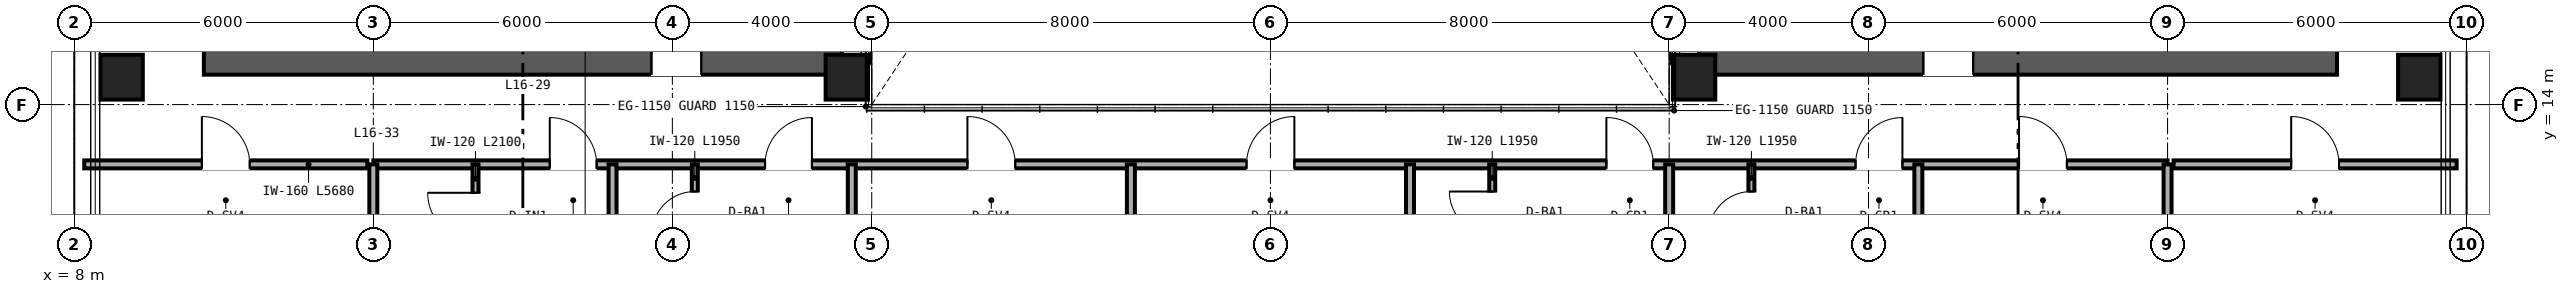
"""IFC4 building model, lengths in metres.
Left out: names, types, materials, properties, quantities, classifications, styles, units other than length and angle.
Written with IfcOpenShell. Run it as: python <this file> out.ifc"""

import sys

from ifc_helpers import new_model, si_unit, direction, frame, frame_2d, origin, origin_2d, place, context, subcontext, project, spatial, rectangle, hollow_rectangle, extrude, source, transform, mapped, element, fill, save


model = new_model("IFC4")
c1 = context("Model", 3, precision=1e-05, world=origin(), true_north=direction((0.0, 1.0)))
c2 = subcontext(c1, "Body", "Model", "MODEL_VIEW")
j1 = project(units=[si_unit("LENGTHUNIT", "METRE"), si_unit("PLANEANGLEUNIT", "RADIAN")], contexts=[c1])
p1 = place(None, origin())
s1 = spatial("IfcSite", under=j1, at=p1, CompositionType="ELEMENT")
p2 = place(p1, origin())
s2 = spatial("IfcBuilding", under=s1, at=p2, CompositionType="ELEMENT")
p3 = place(p2, frame((0.0, 0.0, 67.2)))
s3 = spatial("IfcBuildingStorey", under=s2, at=p3, CompositionType="ELEMENT", Elevation=67.2)
p4 = place(p3, frame((10.6, 15.0, 0.0), z_axis=(0.0, 0.0, 1.0), x_axis=(1.0, 0.0, 0.0)))
e1 = element("IfcWall", 1, at=p4, inside=s3, PredefinedType="SHEAR", context=c2, shape_type="SweptSolid", body=[
    extrude(rectangle(XDim=12.8, YDim=0.8, at=frame_2d((6.4, 0.0))), origin(), (0.0, 0.0, 1.0), 3.35),
])
p5 = place(p4, frame((8.98, 0.0, 0.0)))
e2 = element("IfcOpeningElement", 2, at=p5, cuts=e1, PredefinedType="OPENING", context=c2, shape_type="SweptSolid", body=[
    extrude(rectangle(XDim=1.0, YDim=2.15, at=frame_2d((0.5, 1.075))), frame((0.0, 0.41, 0.0), z_axis=(0.0, -1.0, 0.0), x_axis=(1.0, 0.0, 0.0)), (0.0, 0.0, 1.0), 0.82),
])
p6 = place(p3, frame((40.6, 15.0, 0.0), z_axis=(0.0, 0.0, 1.0), x_axis=(1.0, 0.0, 0.0)))
e3 = element("IfcWall", 3, at=p6, inside=s3, PredefinedType="SHEAR", context=c2, shape_type="SweptSolid", body=[
    extrude(rectangle(XDim=12.8, YDim=0.8, at=frame_2d((6.4, 0.0))), origin(), (0.0, 0.0, 1.0), 3.35),
])
p7 = place(p6, frame((4.5, 0.0, 0.0)))
e4 = element("IfcOpeningElement", 4, at=p7, cuts=e3, PredefinedType="OPENING", context=c2, shape_type="SweptSolid", body=[
    extrude(rectangle(XDim=1.0, YDim=2.15, at=frame_2d((0.5, 1.075))), frame((0.0, 0.41, 0.0), z_axis=(0.0, -1.0, 0.0), x_axis=(1.0, 0.0, 0.0)), (0.0, 0.0, 1.0), 0.82),
])
m1 = source(origin(), c2, "Body", "SweptSolid", [
    extrude(hollow_rectangle(XDim=0.85, YDim=0.9, WallThickness=0.04, at=origin_2d()), origin(), (0.0, 0.0, 1.0), 3.35),
])
for number, where, z_axis, x_axis in (
    (5, (8.95, 14.55, 0.0), (0.0, 0.0, 1.0), (1.0, 0.0, 0.0)),
    (6, (23.5, 14.55, 0.0), (0.0, 0.0, 1.0), (1.0, 0.0, 0.0)),
    (7, (40.5, 14.55, 0.0), (0.0, 0.0, 1.0), (1.0, 0.0, 0.0)),
    (8, (55.05, 14.55, 0.0), (0.0, 0.0, 1.0), (1.0, 0.0, 0.0)),
):
    element("IfcColumn", number, at=place(p3, frame(where, z_axis=z_axis, x_axis=x_axis)), inside=s3, PredefinedType="COLUMN", context=c2, shape_type="MappedRepresentation", body=[
        mapped(m1, transform((0.0, 0.0, 0.0), scale=1.0)),
    ])
p8 = place(p3, frame((8.2, 12.8, 0.0), z_axis=(0.0, 0.0, 1.0), x_axis=(1.0, 0.0, 0.0)))
e9 = element("IfcWall", 9, at=p8, inside=s3, PredefinedType="PARTITIONING", context=c2, shape_type="SweptSolid", body=[
    extrude(rectangle(XDim=5.68, YDim=0.16, at=frame_2d((2.84, 0.0))), origin(), (0.0, 0.0, 1.0), 3.35),
])
p9 = place(p8, frame((2.36, 0.0, 0.0)))
e10 = element("IfcOpeningElement", 10, at=p9, cuts=e9, PredefinedType="OPENING", context=c2, shape_type="SweptSolid", body=[
    extrude(rectangle(XDim=0.96, YDim=2.15, at=frame_2d((0.48, 1.075))), frame((0.0, 0.09, 0.0), z_axis=(0.0, -1.0, 0.0), x_axis=(1.0, 0.0, 0.0)), (0.0, 0.0, 1.0), 0.18),
])
p10 = place(p3, frame((50.12, 12.8, 0.0), z_axis=(0.0, 0.0, 1.0), x_axis=(1.0, 0.0, 0.0)))
e11 = element("IfcWall", 11, at=p10, inside=s3, PredefinedType="PARTITIONING", context=c2, shape_type="SweptSolid", body=[
    extrude(rectangle(XDim=5.68, YDim=0.16, at=frame_2d((2.84, 0.0))), origin(), (0.0, 0.0, 1.0), 3.35),
])
p11 = place(p10, frame((2.36, 0.0, 0.0)))
e12 = element("IfcOpeningElement", 12, at=p11, cuts=e11, PredefinedType="OPENING", context=c2, shape_type="SweptSolid", body=[
    extrude(rectangle(XDim=0.96, YDim=2.15, at=frame_2d((0.48, 1.075))), frame((0.0, 0.09, 0.0), z_axis=(0.0, -1.0, 0.0), x_axis=(1.0, 0.0, 0.0)), (0.0, 0.0, 1.0), 0.18),
])
p12 = place(p3, frame((14.0, 12.8, 0.0), z_axis=(0.0, 0.0, 1.0), x_axis=(1.0, 0.0, 0.0)))
e13 = element("IfcWall", 13, at=p12, inside=s3, PredefinedType="PARTITIONING", context=c2, shape_type="SweptSolid", body=[
    extrude(rectangle(XDim=36.0, YDim=0.16, at=frame_2d((18.0, 0.0))), origin(), (0.0, 0.0, 1.0), 2.571),
])
p13 = place(p12, frame((3.54, 0.0, 0.0)))
e14 = element("IfcOpeningElement", 14, at=p13, cuts=e13, PredefinedType="OPENING", context=c2, shape_type="SweptSolid", body=[
    extrude(rectangle(XDim=0.94, YDim=2.15, at=frame_2d((0.47, 1.075))), frame((0.0, 0.09, 0.0), z_axis=(0.0, -1.0, 0.0), x_axis=(1.0, 0.0, 0.0)), (0.0, 0.0, 1.0), 0.18),
])
p14 = place(p12, frame((7.86, 0.0, 0.0)))
e15 = element("IfcOpeningElement", 15, at=p14, cuts=e13, PredefinedType="OPENING", context=c2, shape_type="SweptSolid", body=[
    extrude(rectangle(XDim=0.94, YDim=2.15, at=frame_2d((0.47, 1.075))), frame((0.0, 0.09, 0.0), z_axis=(0.0, -1.0, 0.0), x_axis=(1.0, 0.0, 0.0)), (0.0, 0.0, 1.0), 0.18),
])
p15 = place(p12, frame((11.92, 0.0, 0.0)))
e16 = element("IfcOpeningElement", 16, at=p15, cuts=e13, PredefinedType="OPENING", context=c2, shape_type="SweptSolid", body=[
    extrude(rectangle(XDim=0.96, YDim=2.15, at=frame_2d((0.48, 1.075))), frame((0.0, 0.09, 0.0), z_axis=(0.0, -1.0, 0.0), x_axis=(1.0, 0.0, 0.0)), (0.0, 0.0, 1.0), 0.18),
])
p16 = place(p12, frame((17.52, 0.0, 0.0)))
e17 = element("IfcOpeningElement", 17, at=p16, cuts=e13, PredefinedType="OPENING", context=c2, shape_type="SweptSolid", body=[
    extrude(rectangle(XDim=0.96, YDim=2.15, at=frame_2d((0.48, 1.075))), frame((0.0, 0.09, 0.0), z_axis=(0.0, -1.0, 0.0), x_axis=(1.0, 0.0, 0.0)), (0.0, 0.0, 1.0), 0.18),
])
p17 = place(p12, frame((24.74, 0.0, 0.0)))
e18 = element("IfcOpeningElement", 18, at=p17, cuts=e13, PredefinedType="OPENING", context=c2, shape_type="SweptSolid", body=[
    extrude(rectangle(XDim=0.94, YDim=2.15, at=frame_2d((0.47, 1.075))), frame((0.0, 0.09, 0.0), z_axis=(0.0, -1.0, 0.0), x_axis=(1.0, 0.0, 0.0)), (0.0, 0.0, 1.0), 0.18),
])
p18 = place(p12, frame((29.74, 0.0, 0.0)))
e19 = element("IfcOpeningElement", 19, at=p18, cuts=e13, PredefinedType="OPENING", context=c2, shape_type="SweptSolid", body=[
    extrude(rectangle(XDim=0.94, YDim=2.15, at=frame_2d((0.47, 1.075))), frame((0.0, 0.09, 0.0), z_axis=(0.0, -1.0, 0.0), x_axis=(1.0, 0.0, 0.0)), (0.0, 0.0, 1.0), 0.18),
])
p19 = place(p12, frame((33.02, 0.0, 0.0)))
e20 = element("IfcOpeningElement", 20, at=p19, cuts=e13, PredefinedType="OPENING", context=c2, shape_type="SweptSolid", body=[
    extrude(rectangle(XDim=0.96, YDim=2.15, at=frame_2d((0.48, 1.075))), frame((0.0, 0.09, 0.0), z_axis=(0.0, -1.0, 0.0), x_axis=(1.0, 0.0, 0.0)), (0.0, 0.0, 1.0), 0.18),
])
for number, where, z_axis, x_axis in (
    (21, (14.0, 2.36, 0.0), (0.0, 0.0, 1.0), (0.0, 1.0, 0.0)),
    (22, (50.0, 2.36, 0.0), (0.0, 0.0, 1.0), (0.0, 1.0, 0.0)),
    (23, (18.8, 2.36, 0.0), (0.0, 0.0, 1.0), (0.0, 1.0, 0.0)),
):
    element("IfcWall", number, at=place(p3, frame(where, z_axis=z_axis, x_axis=x_axis)), inside=s3, PredefinedType="PARTITIONING", context=c2, shape_type="SweptSolid", body=[
        extrude(rectangle(XDim=10.44, YDim=0.16, at=frame_2d((5.22, 0.0))), origin(), (0.0, 0.0, 1.0), 2.657),
    ])
p20 = place(p3, frame((16.05, 10.7, 0.0), z_axis=(0.0, 0.0, 1.0), x_axis=(0.0, 1.0, 0.0)))
e24 = element("IfcWall", 24, at=p20, inside=s3, PredefinedType="PARTITIONING", context=c2, shape_type="SweptSolid", body=[
    extrude(rectangle(XDim=2.1, YDim=0.12, at=frame_2d((1.05, 0.0))), origin(), (0.0, 0.0, 1.0), 3.35),
])
p21 = place(p20, frame((0.57, 0.0, 0.0)))
e25 = element("IfcOpeningElement", 25, at=p21, cuts=e24, PredefinedType="OPENING", context=c2, shape_type="SweptSolid", body=[
    extrude(rectangle(XDim=0.96, YDim=2.15, at=frame_2d((0.48, 1.075))), frame((0.0, 0.07, 0.0), z_axis=(0.0, -1.0, 0.0), x_axis=(1.0, 0.0, 0.0)), (0.0, 0.0, 1.0), 0.14),
])
p22 = place(p3, frame((23.6, 2.36, 0.0), z_axis=(0.0, 0.0, 1.0), x_axis=(0.0, 1.0, 0.0)))
e26 = element("IfcWall", 26, at=p22, inside=s3, PredefinedType="PARTITIONING", context=c2, shape_type="SweptSolid", body=[
    extrude(rectangle(XDim=10.44, YDim=0.16, at=frame_2d((5.22, 0.0))), origin(), (0.0, 0.0, 1.0), 2.423),
])
p23 = place(p3, frame((20.45, 10.85, 0.0), z_axis=(0.0, 0.0, 1.0), x_axis=(0.0, 1.0, 0.0)))
e27 = element("IfcWall", 27, at=p23, inside=s3, PredefinedType="PARTITIONING", context=c2, shape_type="SweptSolid", body=[
    extrude(rectangle(XDim=1.95, YDim=0.12, at=frame_2d((0.975, 0.0))), origin(), (0.0, 0.0, 1.0), 3.35),
])
p24 = place(p23, frame((0.545, 0.0, 0.0)))
e28 = element("IfcOpeningElement", 28, at=p24, cuts=e27, PredefinedType="OPENING", context=c2, shape_type="SweptSolid", body=[
    extrude(rectangle(XDim=0.86, YDim=2.1, at=frame_2d((0.43, 1.05))), frame((0.0, 0.07, 0.0), z_axis=(0.0, -1.0, 0.0), x_axis=(1.0, 0.0, 0.0)), (0.0, 0.0, 1.0), 0.14),
])
for number, where, z_axis, x_axis in (
    (29, (29.2, 2.36, 0.0), (0.0, 0.0, 1.0), (0.0, 1.0, 0.0)),
    (30, (34.8, 2.36, 0.0), (0.0, 0.0, 1.0), (0.0, 1.0, 0.0)),
    (31, (40.0, 2.36, 0.0), (0.0, 0.0, 1.0), (0.0, 1.0, 0.0)),
):
    element("IfcWall", number, at=place(p3, frame(where, z_axis=z_axis, x_axis=x_axis)), inside=s3, PredefinedType="PARTITIONING", context=c2, shape_type="SweptSolid", body=[
        extrude(rectangle(XDim=10.44, YDim=0.16, at=frame_2d((5.22, 0.0))), origin(), (0.0, 0.0, 1.0), 2.423),
    ])
p25 = place(p3, frame((36.45, 10.85, 0.0), z_axis=(0.0, 0.0, 1.0), x_axis=(0.0, 1.0, 0.0)))
e32 = element("IfcWall", 32, at=p25, inside=s3, PredefinedType="PARTITIONING", context=c2, shape_type="SweptSolid", body=[
    extrude(rectangle(XDim=1.95, YDim=0.12, at=frame_2d((0.975, 0.0))), origin(), (0.0, 0.0, 1.0), 3.35),
])
p26 = place(p25, frame((0.545, 0.0, 0.0)))
e33 = element("IfcOpeningElement", 33, at=p26, cuts=e32, PredefinedType="OPENING", context=c2, shape_type="SweptSolid", body=[
    extrude(rectangle(XDim=0.86, YDim=2.1, at=frame_2d((0.43, 1.05))), frame((0.0, 0.07, 0.0), z_axis=(0.0, -1.0, 0.0), x_axis=(1.0, 0.0, 0.0)), (0.0, 0.0, 1.0), 0.14),
])
p27 = place(p3, frame((45.0, 2.36, 0.0), z_axis=(0.0, 0.0, 1.0), x_axis=(0.0, 1.0, 0.0)))
e34 = element("IfcWall", 34, at=p27, inside=s3, PredefinedType="PARTITIONING", context=c2, shape_type="SweptSolid", body=[
    extrude(rectangle(XDim=10.44, YDim=0.16, at=frame_2d((5.22, 0.0))), origin(), (0.0, 0.0, 1.0), 2.657),
])
p28 = place(p3, frame((41.65, 10.85, 0.0), z_axis=(0.0, 0.0, 1.0), x_axis=(0.0, 1.0, 0.0)))
e35 = element("IfcWall", 35, at=p28, inside=s3, PredefinedType="PARTITIONING", context=c2, shape_type="SweptSolid", body=[
    extrude(rectangle(XDim=1.95, YDim=0.12, at=frame_2d((0.975, 0.0))), origin(), (0.0, 0.0, 1.0), 3.35),
])
p29 = place(p28, frame((0.545, 0.0, 0.0)))
e36 = element("IfcOpeningElement", 36, at=p29, cuts=e35, PredefinedType="OPENING", context=c2, shape_type="SweptSolid", body=[
    extrude(rectangle(XDim=0.86, YDim=2.1, at=frame_2d((0.43, 1.05))), frame((0.0, 0.07, 0.0), z_axis=(0.0, -1.0, 0.0), x_axis=(1.0, 0.0, 0.0)), (0.0, 0.0, 1.0), 0.14),
])
m2 = source(origin(), c2, "Body", "SweptSolid", [
    extrude(rectangle(XDim=1.0, YDim=2.15, at=frame_2d((0.5, 1.075))), frame((0.0, 0.025, 0.0), z_axis=(0.0, -1.0, 0.0), x_axis=(1.0, 0.0, 0.0)), (0.0, 0.0, 1.0), 0.05),
])
p30 = place(p5, origin())
e37 = element("IfcDoor", 37, at=p30, inside=s3, OperationType="SINGLE_SWING_LEFT", PredefinedType="DOOR", context=c2, shape_type="MappedRepresentation", body=[
    mapped(m2, transform((0.0, 0.0, 0.0), scale=1.0)),
])
fill(e2, e37)
p31 = place(p7, origin())
e38 = element("IfcDoor", 38, at=p31, inside=s3, OperationType="SINGLE_SWING_RIGHT", PredefinedType="DOOR", context=c2, shape_type="MappedRepresentation", body=[
    mapped(m2, transform((0.0, 0.0, 0.0), scale=1.0)),
])
fill(e4, e38)
m3 = source(origin(), c2, "Body", "SweptSolid", [
    extrude(rectangle(XDim=0.96, YDim=2.15, at=frame_2d((0.48, 1.075))), frame((0.0, 0.025, 0.0), z_axis=(0.0, -1.0, 0.0), x_axis=(1.0, 0.0, 0.0)), (0.0, 0.0, 1.0), 0.05),
])
p32 = place(p9, origin())
e39 = element("IfcDoor", 39, at=p32, inside=s3, OperationType="SINGLE_SWING_LEFT", PredefinedType="DOOR", context=c2, shape_type="MappedRepresentation", body=[
    mapped(m3, transform((0.0, 0.0, 0.0), scale=1.0)),
])
fill(e10, e39)
p33 = place(p11, origin())
e40 = element("IfcDoor", 40, at=p33, inside=s3, OperationType="SINGLE_SWING_LEFT", PredefinedType="DOOR", context=c2, shape_type="MappedRepresentation", body=[
    mapped(m3, transform((0.0, 0.0, 0.0), scale=1.0)),
])
fill(e12, e40)
p34 = place(p21, origin())
e41 = element("IfcDoor", 41, at=p34, inside=s3, OperationType="SINGLE_SWING_RIGHT", PredefinedType="DOOR", context=c2, shape_type="MappedRepresentation", body=[
    mapped(m3, transform((0.0, 0.0, 0.0), scale=1.0)),
])
fill(e25, e41)
m4 = source(origin(), c2, "Body", "SweptSolid", [
    extrude(rectangle(XDim=0.86, YDim=2.1, at=frame_2d((0.43, 1.05))), frame((0.0, 0.025, 0.0), z_axis=(0.0, -1.0, 0.0), x_axis=(1.0, 0.0, 0.0)), (0.0, 0.0, 1.0), 0.05),
])
p35 = place(p24, origin())
e42 = element("IfcDoor", 42, at=p35, inside=s3, OperationType="SINGLE_SWING_LEFT", PredefinedType="DOOR", context=c2, shape_type="MappedRepresentation", body=[
    mapped(m4, transform((0.0, 0.0, 0.0), scale=1.0)),
])
fill(e28, e42)
p36 = place(p26, origin())
e43 = element("IfcDoor", 43, at=p36, inside=s3, OperationType="SINGLE_SWING_RIGHT", PredefinedType="DOOR", context=c2, shape_type="MappedRepresentation", body=[
    mapped(m4, transform((0.0, 0.0, 0.0), scale=1.0)),
])
fill(e33, e43)
p37 = place(p29, origin())
e44 = element("IfcDoor", 44, at=p37, inside=s3, OperationType="SINGLE_SWING_LEFT", PredefinedType="DOOR", context=c2, shape_type="MappedRepresentation", body=[
    mapped(m4, transform((0.0, 0.0, 0.0), scale=1.0)),
])
fill(e36, e44)
m5 = source(origin(), c2, "Body", "SweptSolid", [
    extrude(rectangle(XDim=0.94, YDim=2.15, at=frame_2d((0.47, 1.075))), frame((0.0, 0.025, 0.0), z_axis=(0.0, -1.0, 0.0), x_axis=(1.0, 0.0, 0.0)), (0.0, 0.0, 1.0), 0.05),
])
p38 = place(p13, origin())
e45 = element("IfcDoor", 45, at=p38, inside=s3, OperationType="SINGLE_SWING_LEFT", PredefinedType="DOOR", context=c2, shape_type="MappedRepresentation", body=[
    mapped(m5, transform((0.0, 0.0, 0.0), scale=1.0)),
])
fill(e14, e45)
p39 = place(p14, origin())
e46 = element("IfcDoor", 46, at=p39, inside=s3, OperationType="SINGLE_SWING_RIGHT", PredefinedType="DOOR", context=c2, shape_type="MappedRepresentation", body=[
    mapped(m5, transform((0.0, 0.0, 0.0), scale=1.0)),
])
fill(e15, e46)
p40 = place(p15, origin())
e47 = element("IfcDoor", 47, at=p40, inside=s3, OperationType="SINGLE_SWING_LEFT", PredefinedType="DOOR", context=c2, shape_type="MappedRepresentation", body=[
    mapped(m3, transform((0.0, 0.0, 0.0), scale=1.0)),
])
fill(e16, e47)
p41 = place(p16, origin())
e48 = element("IfcDoor", 48, at=p41, inside=s3, OperationType="SINGLE_SWING_RIGHT", PredefinedType="DOOR", context=c2, shape_type="MappedRepresentation", body=[
    mapped(m3, transform((0.0, 0.0, 0.0), scale=1.0)),
])
fill(e17, e48)
p42 = place(p17, origin())
e49 = element("IfcDoor", 49, at=p42, inside=s3, OperationType="SINGLE_SWING_LEFT", PredefinedType="DOOR", context=c2, shape_type="MappedRepresentation", body=[
    mapped(m5, transform((0.0, 0.0, 0.0), scale=1.0)),
])
fill(e18, e49)
p43 = place(p18, origin())
e50 = element("IfcDoor", 50, at=p43, inside=s3, OperationType="SINGLE_SWING_RIGHT", PredefinedType="DOOR", context=c2, shape_type="MappedRepresentation", body=[
    mapped(m5, transform((0.0, 0.0, 0.0), scale=1.0)),
])
fill(e19, e50)
p44 = place(p19, origin())
e51 = element("IfcDoor", 51, at=p44, inside=s3, OperationType="SINGLE_SWING_LEFT", PredefinedType="DOOR", context=c2, shape_type="MappedRepresentation", body=[
    mapped(m3, transform((0.0, 0.0, 0.0), scale=1.0)),
])
fill(e20, e51)
save(model, sys.argv[1])
